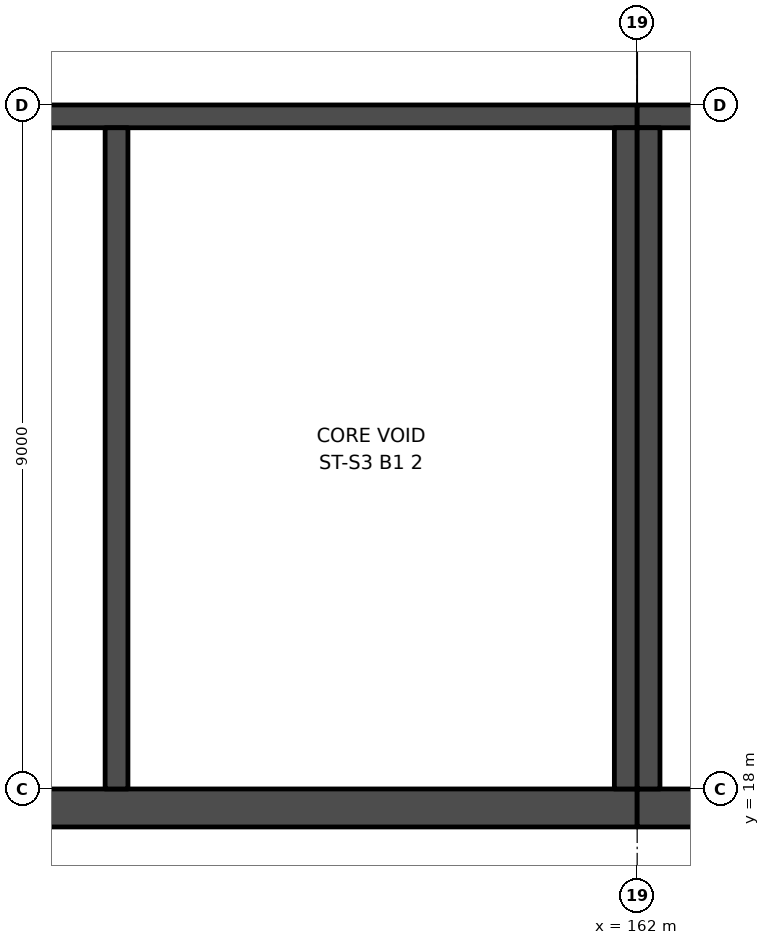
"""IFC4 building model, lengths in metres.
Left out: names, types, materials, properties, quantities, classifications, styles, units other than length and angle.
Written with IfcOpenShell. Run it as: python <this file> out.ifc"""

import sys

from ifc_helpers import new_model, si_unit, direction, frame, frame_2d, origin, place, context, subcontext, project, spatial, rectangle, extrude, element, save


model = new_model("IFC4")
c1 = context("Model", 3, precision=1e-05, world=origin(), true_north=direction((0.0, 1.0)))
c2 = subcontext(c1, "Body", "Model", "MODEL_VIEW")
j1 = project(units=[si_unit("LENGTHUNIT", "METRE"), si_unit("PLANEANGLEUNIT", "RADIAN")], contexts=[c1])
p1 = place(None, origin())
s1 = spatial("IfcSite", under=j1, at=p1, CompositionType="ELEMENT")
p2 = place(p1, origin())
s2 = spatial("IfcBuilding", under=s1, at=p2, CompositionType="ELEMENT")
p3 = place(p2, frame((0.0, 0.0, -6.0)))
s3 = spatial("IfcBuildingStorey", under=s2, at=p3, CompositionType="ELEMENT", Elevation=-6.0)
p4 = place(p3, frame((144.0, 26.85, 0.0), z_axis=(0.0, 0.0, 1.0), x_axis=(1.0, 0.0, 0.0)))
e1 = element("IfcWall", 1, at=p4, inside=s3, PredefinedType="SHEAR", context=c2, shape_type="SweptSolid", body=[
    extrude(rectangle(XDim=18.0, YDim=0.3, at=frame_2d((9.0, 0.0))), origin(), (0.0, 0.0, 1.0), 6.0),
])
p5 = place(p4, frame((1.5, 0.0, 0.0)))
e2 = element("IfcOpeningElement", 2, at=p5, cuts=e1, PredefinedType="OPENING", context=c2, shape_type="SweptSolid", body=[
    extrude(rectangle(XDim=1.2, YDim=2.1, at=frame_2d((0.6, 1.05))), frame((0.0, 0.16, 0.0), z_axis=(0.0, -1.0, 0.0), x_axis=(1.0, 0.0, 0.0)), (0.0, 0.0, 1.0), 0.32),
])
p6 = place(p3, frame((144.0, 17.75, 0.0), z_axis=(0.0, 0.0, 1.0), x_axis=(1.0, 0.0, 0.0)))
e3 = element("IfcWall", 3, at=p6, inside=s3, PredefinedType="SHEAR", context=c2, shape_type="SweptSolid", body=[
    extrude(rectangle(XDim=18.0, YDim=0.5, at=frame_2d((9.0, 0.0))), origin(), (0.0, 0.0, 1.0), 6.0),
])
for number, where, z_axis, x_axis in (
    (4, (161.85, 26.7, 0.0), (0.0, 0.0, 1.0), (0.0, -1.0, 0.0)),
    (5, (155.15, 26.7, 0.0), (0.0, 0.0, 1.0), (0.0, -1.0, 0.0)),
):
    element("IfcWall", number, at=place(p3, frame(where, z_axis=z_axis, x_axis=x_axis)), inside=s3, PredefinedType="SHEAR", context=c2, shape_type="SweptSolid", body=[
        extrude(rectangle(XDim=8.7, YDim=0.3, at=frame_2d((4.35, 0.0))), origin(), (0.0, 0.0, 1.0), 6.0),
    ])
p7 = place(p3, frame((180.0, 26.85, 0.0), z_axis=(0.0, 0.0, 1.0), x_axis=(-1.0, 0.0, 0.0)))
e6 = element("IfcWall", 6, at=p7, inside=s3, PredefinedType="SHEAR", context=c2, shape_type="SweptSolid", body=[
    extrude(rectangle(XDim=18.0, YDim=0.3, at=frame_2d((9.0, 0.0))), origin(), (0.0, 0.0, 1.0), 6.0),
])
p8 = place(p3, frame((180.0, 17.75, 0.0), z_axis=(0.0, 0.0, 1.0), x_axis=(-1.0, 0.0, 0.0)))
e7 = element("IfcWall", 7, at=p8, inside=s3, PredefinedType="SHEAR", context=c2, shape_type="SweptSolid", body=[
    extrude(rectangle(XDim=18.0, YDim=0.5, at=frame_2d((9.0, 0.0))), origin(), (0.0, 0.0, 1.0), 6.0),
])
p9 = place(p3, frame((162.15, 26.7, 0.0), z_axis=(0.0, 0.0, 1.0), x_axis=(0.0, -1.0, 0.0)))
e8 = element("IfcWall", 8, at=p9, inside=s3, PredefinedType="SHEAR", context=c2, shape_type="SweptSolid", body=[
    extrude(rectangle(XDim=8.7, YDim=0.3, at=frame_2d((4.35, 0.0))), origin(), (0.0, 0.0, 1.0), 6.0),
])
save(model, sys.argv[1])
